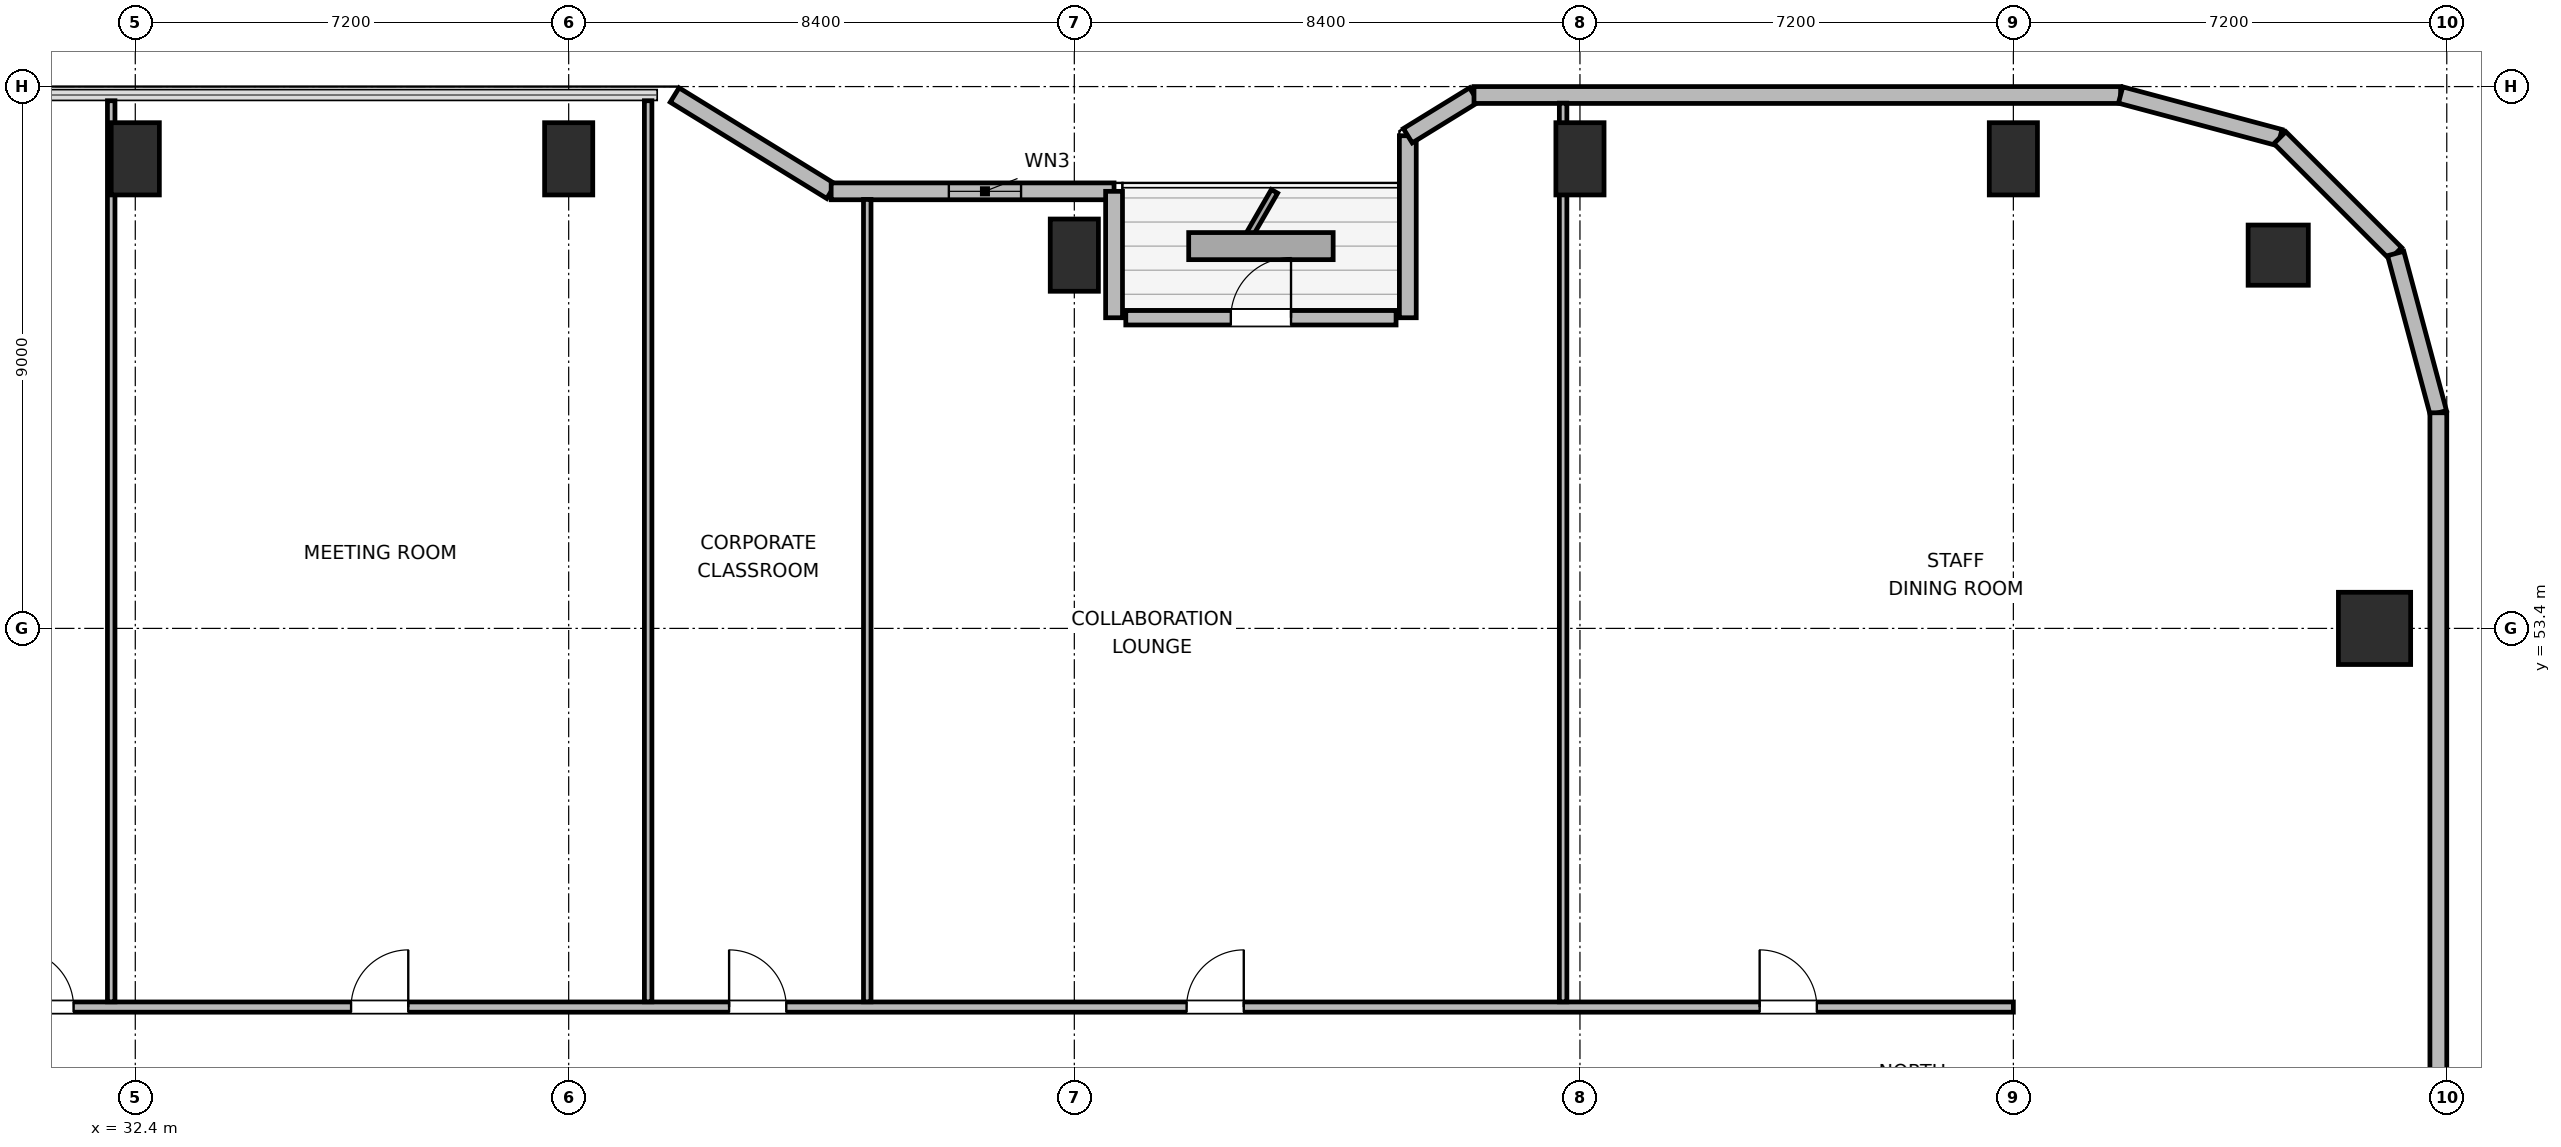
"""IFC4 building model, lengths in metres.
Left out: names, types, materials, properties, quantities, classifications, styles, units other than length and angle.
Written with IfcOpenShell. Run it as: python <this file> out.ifc"""

import sys

from ifc_helpers import new_model, si_unit, direction, frame, frame_2d, origin, origin_2d, place, context, subcontext, project, spatial, rectangle, circle, extrude, element, fill, save


model = new_model("IFC4")
c1 = context("Model", 3, precision=1e-05, world=origin(), true_north=direction((0.0, 1.0)))
c2 = subcontext(c1, "Body", "Model", "MODEL_VIEW")
j1 = project(units=[si_unit("LENGTHUNIT", "METRE"), si_unit("PLANEANGLEUNIT", "RADIAN")], contexts=[c1])
p1 = place(None, origin())
s1 = spatial("IfcSite", under=j1, at=p1, CompositionType="ELEMENT")
p2 = place(p1, origin())
s2 = spatial("IfcBuilding", under=s1, at=p2, CompositionType="ELEMENT")
p3 = place(p2, frame((0.0, 0.0, 170.1)))
s3 = spatial("IfcBuildingStorey", under=s2, at=p3, CompositionType="ELEMENT", Elevation=170.1)
p4 = place(p3, frame((68.0, 59.6, 0.0), z_axis=(0.0, 0.0, 1.0), x_axis=(1.0, 0.0, 0.0)))
e1 = element("IfcColumn", 1, at=p4, inside=s3, PredefinedType="COLUMN", context=c2, shape_type="SweptSolid", body=[
    extrude(circle(Radius=0.5, at=origin_2d()), origin(), (0.0, 0.0, 1.0), 3.9),
])
for number, where, z_axis, x_axis in (
    (2, (32.4, 61.2, 0.0), (0.0, 0.0, 1.0), (1.0, 0.0, 0.0)),
    (3, (39.6, 61.2, 0.0), (0.0, 0.0, 1.0), (1.0, 0.0, 0.0)),
    (4, (48.0, 59.6, 0.0), (0.0, 0.0, 1.0), (1.0, 0.0, 0.0)),
    (5, (56.4, 61.2, 0.0), (0.0, 0.0, 1.0), (1.0, 0.0, 0.0)),
    (6, (63.6, 61.2, 0.0), (0.0, 0.0, 1.0), (1.0, 0.0, 0.0)),
):
    element("IfcColumn", number, at=place(p3, frame(where, z_axis=z_axis, x_axis=x_axis)), inside=s3, PredefinedType="COLUMN", context=c2, shape_type="SweptSolid", body=[
        extrude(rectangle(XDim=0.8, YDim=1.2, at=origin_2d()), origin(), (0.0, 0.0, 1.0), 3.9),
    ])
p5 = place(p3, frame((69.6, 53.4, 0.0), z_axis=(0.0, 0.0, 1.0), x_axis=(1.0, 0.0, 0.0)))
e7 = element("IfcColumn", 7, at=p5, inside=s3, PredefinedType="COLUMN", context=c2, shape_type="SweptSolid", body=[
    extrude(rectangle(XDim=1.2, YDim=1.2, at=origin_2d()), origin(), (0.0, 0.0, 1.0), 3.9),
])
p6 = place(p3, frame((41.36, 62.26, 0.0), z_axis=(0.0, 0.0, 1.0), x_axis=(0.851652825334, -0.524106349037, 0.0)))
e8 = element("IfcWall", 8, at=p6, inside=s3, PredefinedType="SOLIDWALL", context=c2, shape_type="SweptSolid", body=[
    extrude(rectangle(XDim=3.053, YDim=0.28, at=frame_2d((1.526, 0.0))), origin(), (0.0, 0.0, 1.0), 2.265),
])
p7 = place(p3, frame((43.96, 60.66, 0.0), z_axis=(0.0, 0.0, 1.0), x_axis=(1.0, 0.0, 0.0)))
e9 = element("IfcWall", 9, at=p7, inside=s3, PredefinedType="SOLIDWALL", context=c2, shape_type="SweptSolid", body=[
    extrude(rectangle(XDim=4.699, YDim=0.28, at=frame_2d((2.35, 0.0))), origin(), (0.0, 0.0, 1.0), 2.265),
])
p8 = place(p7, frame((1.955, 0.0, 0.85)))
e10 = element("IfcOpeningElement", 10, at=p8, cuts=e9, PredefinedType="OPENING", context=c2, shape_type="SweptSolid", body=[
    extrude(rectangle(XDim=1.2, YDim=1.1, at=frame_2d((0.6, 0.55))), frame((0.0, 0.15, 0.0), z_axis=(0.0, -1.0, 0.0), x_axis=(1.0, 0.0, 0.0)), (0.0, 0.0, 1.0), 0.3),
])
p9 = place(p3, frame((48.66, 60.66, 0.0), z_axis=(0.0, 0.0, 1.0), x_axis=(0.0, -1.0, 0.0)))
e11 = element("IfcWall", 11, at=p9, inside=s3, PredefinedType="SOLIDWALL", context=c2, shape_type="SweptSolid", body=[
    extrude(rectangle(XDim=2.1, YDim=0.28, at=frame_2d((1.05, 0.0))), origin(), (0.0, 0.0, 1.0), 2.265),
])
p10 = place(p3, frame((48.855, 58.56, 0.0), z_axis=(0.0, 0.0, 1.0), x_axis=(1.0, 0.0, 0.0)))
e12 = element("IfcWall", 12, at=p10, inside=s3, PredefinedType="SOLIDWALL", context=c2, shape_type="SweptSolid", body=[
    extrude(rectangle(XDim=4.49, YDim=0.24, at=frame_2d((2.245, 0.0))), origin(), (0.0, 0.0, 1.0), 3.68),
])
p11 = place(p10, frame((1.745, 0.0, 0.0)))
e13 = element("IfcOpeningElement", 13, at=p11, cuts=e12, PredefinedType="OPENING", context=c2, shape_type="SweptSolid", body=[
    extrude(rectangle(XDim=1.0, YDim=2.02, at=frame_2d((0.5, 1.01))), frame((0.0, 0.13, 0.0), z_axis=(0.0, -1.0, 0.0), x_axis=(1.0, 0.0, 0.0)), (0.0, 0.0, 1.0), 0.26),
])
p12 = place(p3, frame((53.54, 58.56, 0.0), z_axis=(0.0, 0.0, 1.0), x_axis=(0.0, 1.0, 0.0)))
e14 = element("IfcWall", 14, at=p12, inside=s3, PredefinedType="SOLIDWALL", context=c2, shape_type="SweptSolid", body=[
    extrude(rectangle(XDim=3.024, YDim=0.28, at=frame_2d((1.512, 0.0))), origin(), (0.0, 0.0, 1.0), 2.265),
])
p13 = place(p3, frame((53.54, 61.584, 0.0), z_axis=(0.0, 0.0, 1.0), x_axis=(0.851801140441, 0.523865266212, 0.0)))
e15 = element("IfcWall", 15, at=p13, inside=s3, PredefinedType="SOLIDWALL", context=c2, shape_type="SweptSolid", body=[
    extrude(rectangle(XDim=1.291, YDim=0.28, at=frame_2d((0.646, 0.0))), origin(), (0.0, 0.0, 1.0), 3.68),
])
p14 = place(p3, frame((54.64, 62.26, 0.0), z_axis=(0.0, 0.0, 1.0), x_axis=(1.0, 0.0, 0.0)))
e16 = element("IfcWall", 16, at=p14, inside=s3, PredefinedType="SOLIDWALL", context=c2, shape_type="SweptSolid", body=[
    extrude(rectangle(XDim=10.742, YDim=0.28, at=frame_2d((5.371, 0.0))), origin(), (0.0, 0.0, 1.0), 3.68),
])
p15 = place(p3, frame((65.382, 62.26, 0.0), z_axis=(0.0, 0.0, 1.0), x_axis=(0.965971118627, -0.258649952598, 0.0)))
e17 = element("IfcWall", 17, at=p15, inside=s3, PredefinedType="SOLIDWALL", context=c2, shape_type="SweptSolid", body=[
    extrude(rectangle(XDim=2.739, YDim=0.28, at=frame_2d((1.37, 0.0))), origin(), (0.0, 0.0, 1.0), 3.68),
])
p16 = place(p3, frame((68.028, 61.552, 0.0), z_axis=(0.0, 0.0, 1.0), x_axis=(0.707061915429, -0.707151644098, 0.0)))
e18 = element("IfcWall", 18, at=p16, inside=s3, PredefinedType="SOLIDWALL", context=c2, shape_type="SweptSolid", body=[
    extrude(rectangle(XDim=2.721, YDim=0.28, at=frame_2d((1.36, 0.0))), origin(), (0.0, 0.0, 1.0), 3.68),
])
p17 = place(p3, frame((69.951, 59.627, 0.0), z_axis=(0.0, 0.0, 1.0), x_axis=(0.258672222976, -0.9659651552, 0.0)))
e19 = element("IfcWall", 19, at=p17, inside=s3, PredefinedType="SOLIDWALL", context=c2, shape_type="SweptSolid", body=[
    extrude(rectangle(XDim=2.739, YDim=0.28, at=frame_2d((1.37, 0.0))), origin(), (0.0, 0.0, 1.0), 3.68),
])
p18 = place(p3, frame((70.66, 56.982, 0.0), z_axis=(0.0, 0.0, 1.0), x_axis=(0.0, -1.0, 0.0)))
e20 = element("IfcWall", 20, at=p18, inside=s3, PredefinedType="SOLIDWALL", context=c2, shape_type="SweptSolid", body=[
    extrude(rectangle(XDim=14.242, YDim=0.28, at=frame_2d((7.121, 0.0))), origin(), (0.0, 0.0, 1.0), 3.68),
])
p19 = place(p3, frame((29.8, 47.11, 0.0), z_axis=(0.0, 0.0, 1.0), x_axis=(1.0, 0.0, 0.0)))
e21 = element("IfcWall", 21, at=p19, inside=s3, PredefinedType="PARTITIONING", context=c2, shape_type="SweptSolid", body=[
    extrude(rectangle(XDim=33.8, YDim=0.17, at=frame_2d((16.9, 0.0))), origin(), (0.0, 0.0, 1.0), 3.68),
])
p20 = place(p19, frame((0.625, 0.0, 0.0)))
e22 = element("IfcOpeningElement", 22, at=p20, cuts=e21, PredefinedType="OPENING", context=c2, shape_type="SweptSolid", body=[
    extrude(rectangle(XDim=0.95, YDim=2.04, at=frame_2d((0.475, 1.02))), frame((0.0, 0.095, 0.0), z_axis=(0.0, -1.0, 0.0), x_axis=(1.0, 0.0, 0.0)), (0.0, 0.0, 1.0), 0.19),
])
p21 = place(p19, frame((6.185, 0.0, 0.0)))
e23 = element("IfcOpeningElement", 23, at=p21, cuts=e21, PredefinedType="OPENING", context=c2, shape_type="SweptSolid", body=[
    extrude(rectangle(XDim=0.95, YDim=2.04, at=frame_2d((0.475, 1.02))), frame((0.0, 0.095, 0.0), z_axis=(0.0, -1.0, 0.0), x_axis=(1.0, 0.0, 0.0)), (0.0, 0.0, 1.0), 0.19),
])
p22 = place(p19, frame((12.465, 0.0, 0.0)))
e24 = element("IfcOpeningElement", 24, at=p22, cuts=e21, PredefinedType="OPENING", context=c2, shape_type="SweptSolid", body=[
    extrude(rectangle(XDim=0.95, YDim=2.04, at=frame_2d((0.475, 1.02))), frame((0.0, 0.095, 0.0), z_axis=(0.0, -1.0, 0.0), x_axis=(1.0, 0.0, 0.0)), (0.0, 0.0, 1.0), 0.19),
])
p23 = place(p19, frame((20.065, 0.0, 0.0)))
e25 = element("IfcOpeningElement", 25, at=p23, cuts=e21, PredefinedType="OPENING", context=c2, shape_type="SweptSolid", body=[
    extrude(rectangle(XDim=0.95, YDim=2.04, at=frame_2d((0.475, 1.02))), frame((0.0, 0.095, 0.0), z_axis=(0.0, -1.0, 0.0), x_axis=(1.0, 0.0, 0.0)), (0.0, 0.0, 1.0), 0.19),
])
p24 = place(p19, frame((29.585, 0.0, 0.0)))
e26 = element("IfcOpeningElement", 26, at=p24, cuts=e21, PredefinedType="OPENING", context=c2, shape_type="SweptSolid", body=[
    extrude(rectangle(XDim=0.95, YDim=2.04, at=frame_2d((0.475, 1.02))), frame((0.0, 0.095, 0.0), z_axis=(0.0, -1.0, 0.0), x_axis=(1.0, 0.0, 0.0)), (0.0, 0.0, 1.0), 0.19),
])
p25 = place(p3, frame((32.0, 47.197, 0.0), z_axis=(0.0, 0.0, 1.0), x_axis=(0.0, 1.0, 0.0)))
e27 = element("IfcWall", 27, at=p25, inside=s3, PredefinedType="PARTITIONING", context=c2, shape_type="SweptSolid", body=[
    extrude(rectangle(XDim=14.968, YDim=0.125, at=frame_2d((7.484, 0.0))), origin(), (0.0, 0.0, 1.0), 3.68),
])
p26 = place(p3, frame((40.92, 47.197, 0.0), z_axis=(0.0, 0.0, 1.0), x_axis=(0.0, 1.0, 0.0)))
e28 = element("IfcWall", 28, at=p26, inside=s3, PredefinedType="PARTITIONING", context=c2, shape_type="SweptSolid", body=[
    extrude(rectangle(XDim=14.968, YDim=0.125, at=frame_2d((7.484, 0.0))), origin(), (0.0, 0.0, 1.0), 3.043),
])
p27 = place(p3, frame((44.56, 47.197, 0.0), z_axis=(0.0, 0.0, 1.0), x_axis=(0.0, 1.0, 0.0)))
e29 = element("IfcWall", 29, at=p27, inside=s3, PredefinedType="PARTITIONING", context=c2, shape_type="SweptSolid", body=[
    extrude(rectangle(XDim=13.328, YDim=0.125, at=frame_2d((6.664, 0.0))), origin(), (0.0, 0.0, 1.0), 3.043),
])
p28 = place(p3, frame((56.12, 47.197, 0.0), z_axis=(0.0, 0.0, 1.0), x_axis=(0.0, 1.0, 0.0)))
e30 = element("IfcWall", 30, at=p28, inside=s3, PredefinedType="PARTITIONING", context=c2, shape_type="SweptSolid", body=[
    extrude(rectangle(XDim=14.928, YDim=0.125, at=frame_2d((7.464, 0.0))), origin(), (0.0, 0.0, 1.0), 3.043),
])
p29 = place(p8, origin())
e31 = element("IfcWindow", 31, at=p29, inside=s3, PartitioningType="SINGLE_PANEL", PredefinedType="WINDOW", context=c2, shape_type="SweptSolid", body=[
    extrude(rectangle(XDim=1.2, YDim=1.1, at=frame_2d((0.6, 0.55))), frame((0.0, 0.03, 0.0), z_axis=(0.0, -1.0, 0.0), x_axis=(1.0, 0.0, 0.0)), (0.0, 0.0, 1.0), 0.06),
])
fill(e10, e31)
p30 = place(p11, origin())
e32 = element("IfcDoor", 32, at=p30, inside=s3, OperationType="SINGLE_SWING_RIGHT", PredefinedType="DOOR", context=c2, shape_type="SweptSolid", body=[
    extrude(rectangle(XDim=1.0, YDim=2.02, at=frame_2d((0.5, 1.01))), frame((0.0, 0.025, 0.0), z_axis=(0.0, -1.0, 0.0), x_axis=(1.0, 0.0, 0.0)), (0.0, 0.0, 1.0), 0.05),
])
fill(e13, e32)
p31 = place(p20, origin())
e33 = element("IfcDoor", 33, at=p31, inside=s3, OperationType="SINGLE_SWING_LEFT", PredefinedType="DOOR", context=c2, shape_type="SweptSolid", body=[
    extrude(rectangle(XDim=0.95, YDim=2.04, at=frame_2d((0.475, 1.02))), frame((0.0, 0.025, 0.0), z_axis=(0.0, -1.0, 0.0), x_axis=(1.0, 0.0, 0.0)), (0.0, 0.0, 1.0), 0.05),
])
fill(e22, e33)
p32 = place(p21, origin())
e34 = element("IfcDoor", 34, at=p32, inside=s3, OperationType="SINGLE_SWING_RIGHT", PredefinedType="DOOR", context=c2, shape_type="SweptSolid", body=[
    extrude(rectangle(XDim=0.95, YDim=2.04, at=frame_2d((0.475, 1.02))), frame((0.0, 0.025, 0.0), z_axis=(0.0, -1.0, 0.0), x_axis=(1.0, 0.0, 0.0)), (0.0, 0.0, 1.0), 0.05),
])
fill(e23, e34)
p33 = place(p22, origin())
e35 = element("IfcDoor", 35, at=p33, inside=s3, OperationType="SINGLE_SWING_LEFT", PredefinedType="DOOR", context=c2, shape_type="SweptSolid", body=[
    extrude(rectangle(XDim=0.95, YDim=2.04, at=frame_2d((0.475, 1.02))), frame((0.0, 0.025, 0.0), z_axis=(0.0, -1.0, 0.0), x_axis=(1.0, 0.0, 0.0)), (0.0, 0.0, 1.0), 0.05),
])
fill(e24, e35)
p34 = place(p23, origin())
e36 = element("IfcDoor", 36, at=p34, inside=s3, OperationType="SINGLE_SWING_RIGHT", PredefinedType="DOOR", context=c2, shape_type="SweptSolid", body=[
    extrude(rectangle(XDim=0.95, YDim=2.04, at=frame_2d((0.475, 1.02))), frame((0.0, 0.025, 0.0), z_axis=(0.0, -1.0, 0.0), x_axis=(1.0, 0.0, 0.0)), (0.0, 0.0, 1.0), 0.05),
])
fill(e25, e36)
p35 = place(p24, origin())
e37 = element("IfcDoor", 37, at=p35, inside=s3, OperationType="SINGLE_SWING_LEFT", PredefinedType="DOOR", context=c2, shape_type="SweptSolid", body=[
    extrude(rectangle(XDim=0.95, YDim=2.04, at=frame_2d((0.475, 1.02))), frame((0.0, 0.025, 0.0), z_axis=(0.0, -1.0, 0.0), x_axis=(1.0, 0.0, 0.0)), (0.0, 0.0, 1.0), 0.05),
])
fill(e26, e37)
save(model, sys.argv[1])
